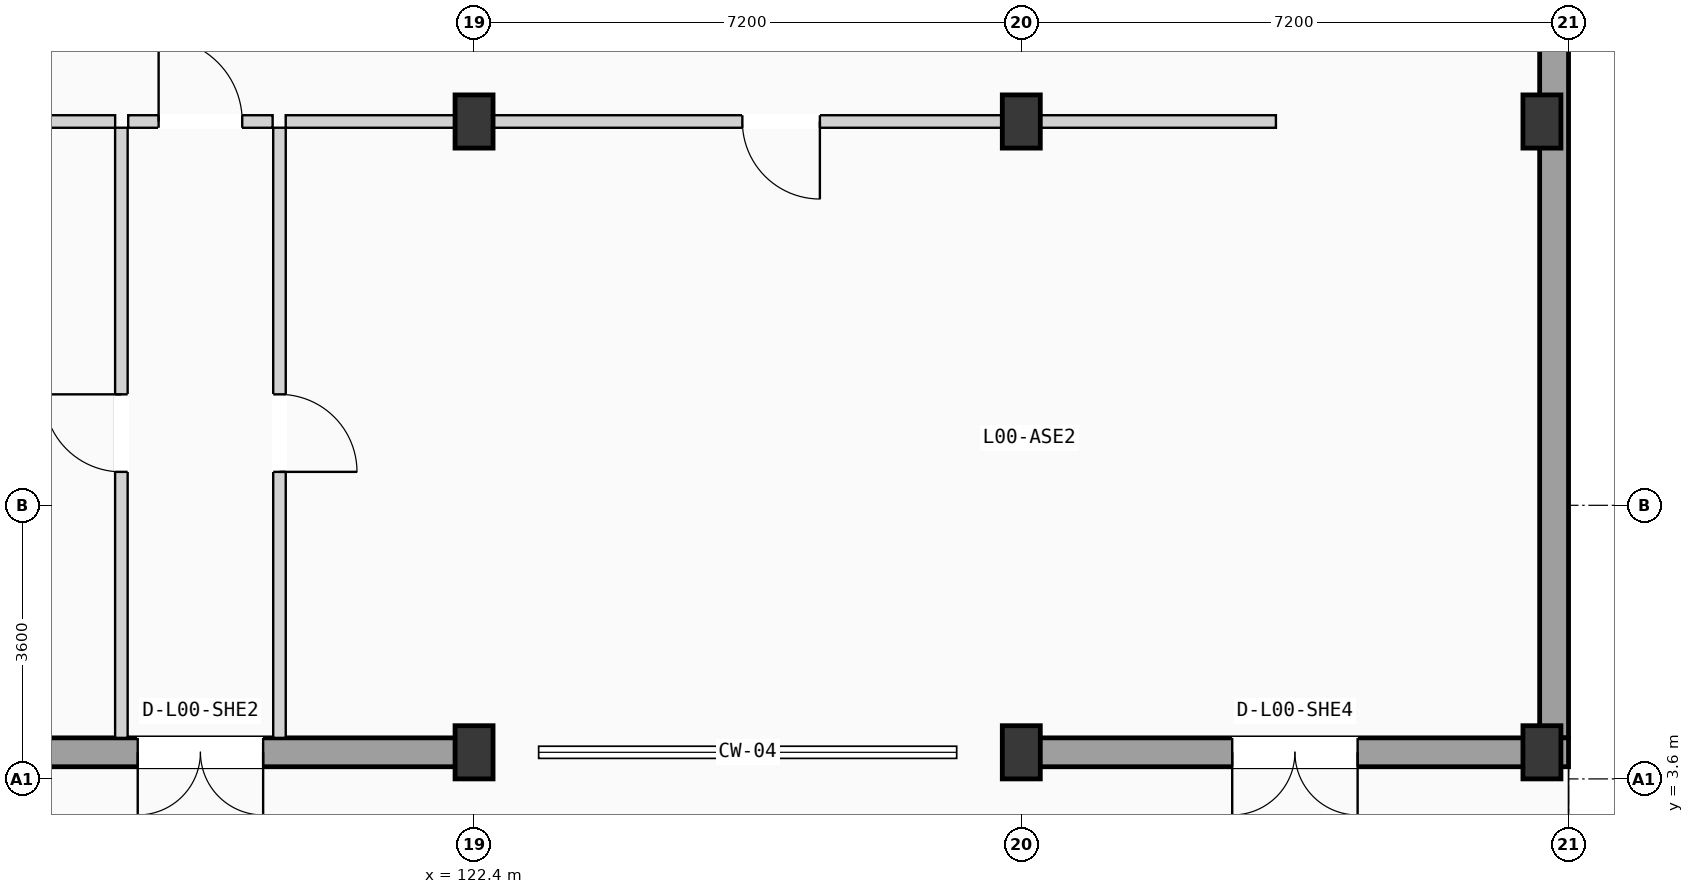
"""IFC4 building model, lengths in metres.
Left out: names, types, materials, properties, quantities, classifications, styles, units other than length and angle.
Written with IfcOpenShell. Run it as: python <this file> out.ifc"""

import sys

from ifc_helpers import new_model, si_unit, direction, frame, frame_2d, origin, origin_2d, place, context, subcontext, project, spatial, rectangle, extrude, element, fill, save


model = new_model("IFC4")
c1 = context("Model", 3, precision=1e-05, world=origin(), true_north=direction((0.0, 1.0)))
c2 = subcontext(c1, "Body", "Model", "MODEL_VIEW")
j1 = project(units=[si_unit("LENGTHUNIT", "METRE"), si_unit("PLANEANGLEUNIT", "RADIAN")], contexts=[c1])
p1 = place(None, origin())
s1 = spatial("IfcSite", under=j1, at=p1, CompositionType="ELEMENT")
p2 = place(p1, origin())
s2 = spatial("IfcBuilding", under=s1, at=p2, CompositionType="ELEMENT")
p3 = place(p2, origin())
s3 = spatial("IfcBuildingStorey", under=s2, at=p3, CompositionType="ELEMENT", Elevation=0.0)
for number, where, z_axis, x_axis in (
    (1, (122.4, 3.95, 0.0), (0.0, 0.0, 1.0), (1.0, 0.0, 0.0)),
    (2, (122.4, 12.25, 0.0), (0.0, 0.0, 1.0), (1.0, 0.0, 0.0)),
    (3, (129.6, 3.95, 0.0), (0.0, 0.0, 1.0), (1.0, 0.0, 0.0)),
    (4, (129.6, 12.25, 0.0), (0.0, 0.0, 1.0), (1.0, 0.0, 0.0)),
    (5, (136.45, 3.95, 0.0), (0.0, 0.0, 1.0), (1.0, 0.0, 0.0)),
    (6, (136.45, 12.25, 0.0), (0.0, 0.0, 1.0), (1.0, 0.0, 0.0)),
):
    element("IfcColumn", number, at=place(p3, frame(where, z_axis=z_axis, x_axis=x_axis)), inside=s3, PredefinedType="COLUMN", context=c2, shape_type="SweptSolid", body=[
        extrude(rectangle(XDim=0.5, YDim=0.7, at=origin_2d()), origin(), (0.0, 0.0, 1.0), 4.9),
    ])
p4 = place(p3, frame((136.61, 4.14, 0.0), z_axis=(0.0, 0.0, 1.0), x_axis=(0.0, 1.0, 0.0)))
e7 = element("IfcWall", 7, at=p4, inside=s3, PredefinedType="SOLIDWALL", context=c2, shape_type="SweptSolid", body=[
    extrude(rectangle(XDim=17.08, YDim=0.38, at=frame_2d((8.54, 0.0))), origin(), (0.0, 0.0, 1.0), 4.625),
])
p5 = place(p3, frame((115.2, 3.95, 0.0), z_axis=(0.0, 0.0, 1.0), x_axis=(1.0, 0.0, 0.0)))
e8 = element("IfcWall", 8, at=p5, inside=s3, PredefinedType="SOLIDWALL", context=c2, shape_type="SweptSolid", body=[
    extrude(rectangle(XDim=7.2, YDim=0.38, at=frame_2d((3.6, 0.0))), origin(), (0.0, 0.0, 1.0), 4.625),
])
p6 = place(p5, frame((2.775, 0.0, 0.0)))
e9 = element("IfcOpeningElement", 9, at=p6, cuts=e8, PredefinedType="OPENING", context=c2, shape_type="SweptSolid", body=[
    extrude(rectangle(XDim=1.65, YDim=2.3, at=frame_2d((0.825, 1.15))), frame((0.0, 0.2, 0.0), z_axis=(0.0, -1.0, 0.0), x_axis=(1.0, 0.0, 0.0)), (0.0, 0.0, 1.0), 0.4),
])
p7 = place(p3, frame((129.6, 3.95, 0.0), z_axis=(0.0, 0.0, 1.0), x_axis=(1.0, 0.0, 0.0)))
e10 = element("IfcWall", 10, at=p7, inside=s3, PredefinedType="SOLIDWALL", context=c2, shape_type="SweptSolid", body=[
    extrude(rectangle(XDim=7.2, YDim=0.38, at=frame_2d((3.6, 0.0))), origin(), (0.0, 0.0, 1.0), 4.625),
])
p8 = place(p7, frame((2.775, 0.0, 0.0)))
e11 = element("IfcOpeningElement", 11, at=p8, cuts=e10, PredefinedType="OPENING", context=c2, shape_type="SweptSolid", body=[
    extrude(rectangle(XDim=1.65, YDim=2.3, at=frame_2d((0.825, 1.15))), frame((0.0, 0.2, 0.0), z_axis=(0.0, -1.0, 0.0), x_axis=(1.0, 0.0, 0.0)), (0.0, 0.0, 1.0), 0.4),
])
p9 = place(p3, frame((117.85, 12.25, 0.0), z_axis=(0.0, 0.0, 1.0), x_axis=(1.0, 0.0, 0.0)))
e12 = element("IfcWall", 12, at=p9, inside=s3, PredefinedType="PARTITIONING", context=c2, shape_type="SweptSolid", body=[
    extrude(rectangle(XDim=1.9, YDim=0.165, at=frame_2d((0.95, 0.0))), origin(), (0.0, 0.0, 1.0), 3.84),
])
p10 = place(p9, frame((0.4, 0.0, 0.0)))
e13 = element("IfcOpeningElement", 13, at=p10, cuts=e12, PredefinedType="OPENING", context=c2, shape_type="SweptSolid", body=[
    extrude(rectangle(XDim=1.1, YDim=2.12, at=frame_2d((0.55, 1.06))), frame((0.0, 0.093, 0.0), z_axis=(0.0, -1.0, 0.0), x_axis=(1.0, 0.0, 0.0)), (0.0, 0.0, 1.0), 0.185),
])
p11 = place(p3, frame((117.76, 4.14, 0.0), z_axis=(0.0, 0.0, 1.0), x_axis=(0.0, 1.0, 0.0)))
e14 = element("IfcWall", 14, at=p11, inside=s3, PredefinedType="PARTITIONING", context=c2, shape_type="SweptSolid", body=[
    extrude(rectangle(XDim=8.028, YDim=0.165, at=frame_2d((4.014, 0.0))), origin(), (0.0, 0.0, 1.0), 3.84),
])
p12 = place(p11, frame((3.5, 0.0, 0.0)))
e15 = element("IfcOpeningElement", 15, at=p12, cuts=e14, PredefinedType="OPENING", context=c2, shape_type="SweptSolid", body=[
    extrude(rectangle(XDim=1.02, YDim=2.16, at=frame_2d((0.51, 1.08))), frame((0.0, 0.093, 0.0), z_axis=(0.0, -1.0, 0.0), x_axis=(1.0, 0.0, 0.0)), (0.0, 0.0, 1.0), 0.185),
])
p13 = place(p3, frame((119.84, 4.14, 0.0), z_axis=(0.0, 0.0, 1.0), x_axis=(0.0, 1.0, 0.0)))
e16 = element("IfcWall", 16, at=p13, inside=s3, PredefinedType="PARTITIONING", context=c2, shape_type="SweptSolid", body=[
    extrude(rectangle(XDim=8.028, YDim=0.165, at=frame_2d((4.014, 0.0))), origin(), (0.0, 0.0, 1.0), 3.84),
])
p14 = place(p13, frame((3.5, 0.0, 0.0)))
e17 = element("IfcOpeningElement", 17, at=p14, cuts=e16, PredefinedType="OPENING", context=c2, shape_type="SweptSolid", body=[
    extrude(rectangle(XDim=1.02, YDim=2.16, at=frame_2d((0.51, 1.08))), frame((0.0, 0.093, 0.0), z_axis=(0.0, -1.0, 0.0), x_axis=(1.0, 0.0, 0.0)), (0.0, 0.0, 1.0), 0.185),
])
p15 = place(p3, frame((111.85, 12.25, 0.0), z_axis=(0.0, 0.0, 1.0), x_axis=(1.0, 0.0, 0.0)))
e18 = element("IfcWall", 18, at=p15, inside=s3, PredefinedType="PARTITIONING", context=c2, shape_type="SweptSolid", body=[
    extrude(rectangle(XDim=5.828, YDim=0.165, at=frame_2d((2.914, 0.0))), origin(), (0.0, 0.0, 1.0), 3.84),
])
p16 = place(p15, frame((1.4, 0.0, 0.0)))
e19 = element("IfcOpeningElement", 19, at=p16, cuts=e18, PredefinedType="OPENING", context=c2, shape_type="SweptSolid", body=[
    extrude(rectangle(XDim=1.02, YDim=2.16, at=frame_2d((0.51, 1.08))), frame((0.0, 0.093, 0.0), z_axis=(0.0, -1.0, 0.0), x_axis=(1.0, 0.0, 0.0)), (0.0, 0.0, 1.0), 0.185),
])
p17 = place(p3, frame((119.922, 12.25, 0.0), z_axis=(0.0, 0.0, 1.0), x_axis=(1.0, 0.0, 0.0)))
e20 = element("IfcWall", 20, at=p17, inside=s3, PredefinedType="PARTITIONING", context=c2, shape_type="SweptSolid", body=[
    extrude(rectangle(XDim=13.028, YDim=0.165, at=frame_2d((6.514, 0.0))), origin(), (0.0, 0.0, 1.0), 3.84),
])
p18 = place(p17, frame((6.008, 0.0, 0.0)))
e21 = element("IfcOpeningElement", 21, at=p18, cuts=e20, PredefinedType="OPENING", context=c2, shape_type="SweptSolid", body=[
    extrude(rectangle(XDim=1.02, YDim=2.16, at=frame_2d((0.51, 1.08))), frame((0.0, 0.093, 0.0), z_axis=(0.0, -1.0, 0.0), x_axis=(1.0, 0.0, 0.0)), (0.0, 0.0, 1.0), 0.185),
])
p19 = place(p6, frame((1.65, 0.0, 0.0), z_axis=(0.0, 0.0, 1.0), x_axis=(-1.0, 0.0, 0.0)))
e22 = element("IfcDoor", 22, at=p19, inside=s3, OperationType="DOUBLE_DOOR_SINGLE_SWING", PredefinedType="DOOR", context=c2, shape_type="SweptSolid", body=[
    extrude(rectangle(XDim=1.65, YDim=2.3, at=frame_2d((0.825, 1.15))), frame((0.0, 0.025, 0.0), z_axis=(0.0, -1.0, 0.0), x_axis=(1.0, 0.0, 0.0)), (0.0, 0.0, 1.0), 0.05),
])
fill(e9, e22)
p20 = place(p8, frame((1.65, 0.0, 0.0), z_axis=(0.0, 0.0, 1.0), x_axis=(-1.0, 0.0, 0.0)))
e23 = element("IfcDoor", 23, at=p20, inside=s3, OperationType="DOUBLE_DOOR_SINGLE_SWING", PredefinedType="DOOR", context=c2, shape_type="SweptSolid", body=[
    extrude(rectangle(XDim=1.65, YDim=2.3, at=frame_2d((0.825, 1.15))), frame((0.0, 0.025, 0.0), z_axis=(0.0, -1.0, 0.0), x_axis=(1.0, 0.0, 0.0)), (0.0, 0.0, 1.0), 0.05),
])
fill(e11, e23)
p21 = place(p10, origin())
e24 = element("IfcDoor", 24, at=p21, inside=s3, OperationType="SINGLE_SWING_LEFT", PredefinedType="DOOR", context=c2, shape_type="SweptSolid", body=[
    extrude(rectangle(XDim=1.1, YDim=2.12, at=frame_2d((0.55, 1.06))), frame((0.0, 0.025, 0.0), z_axis=(0.0, -1.0, 0.0), x_axis=(1.0, 0.0, 0.0)), (0.0, 0.0, 1.0), 0.05),
])
fill(e13, e24)
p22 = place(p12, origin())
e25 = element("IfcDoor", 25, at=p22, inside=s3, OperationType="SINGLE_SWING_RIGHT", PredefinedType="DOOR", context=c2, shape_type="SweptSolid", body=[
    extrude(rectangle(XDim=1.02, YDim=2.16, at=frame_2d((0.51, 1.08))), frame((0.0, 0.025, 0.0), z_axis=(0.0, -1.0, 0.0), x_axis=(1.0, 0.0, 0.0)), (0.0, 0.0, 1.0), 0.05),
])
fill(e15, e25)
p23 = place(p14, frame((1.02, 0.0, 0.0), z_axis=(0.0, 0.0, 1.0), x_axis=(-1.0, 0.0, 0.0)))
e26 = element("IfcDoor", 26, at=p23, inside=s3, OperationType="SINGLE_SWING_LEFT", PredefinedType="DOOR", context=c2, shape_type="SweptSolid", body=[
    extrude(rectangle(XDim=1.02, YDim=2.16, at=frame_2d((0.51, 1.08))), frame((0.0, 0.025, 0.0), z_axis=(0.0, -1.0, 0.0), x_axis=(1.0, 0.0, 0.0)), (0.0, 0.0, 1.0), 0.05),
])
fill(e17, e26)
p24 = place(p18, frame((1.02, 0.0, 0.0), z_axis=(0.0, 0.0, 1.0), x_axis=(-1.0, 0.0, 0.0)))
e27 = element("IfcDoor", 27, at=p24, inside=s3, OperationType="SINGLE_SWING_RIGHT", PredefinedType="DOOR", context=c2, shape_type="SweptSolid", body=[
    extrude(rectangle(XDim=1.02, YDim=2.16, at=frame_2d((0.51, 1.08))), frame((0.0, 0.025, 0.0), z_axis=(0.0, -1.0, 0.0), x_axis=(1.0, 0.0, 0.0)), (0.0, 0.0, 1.0), 0.05),
])
fill(e21, e27)
save(model, sys.argv[1])
